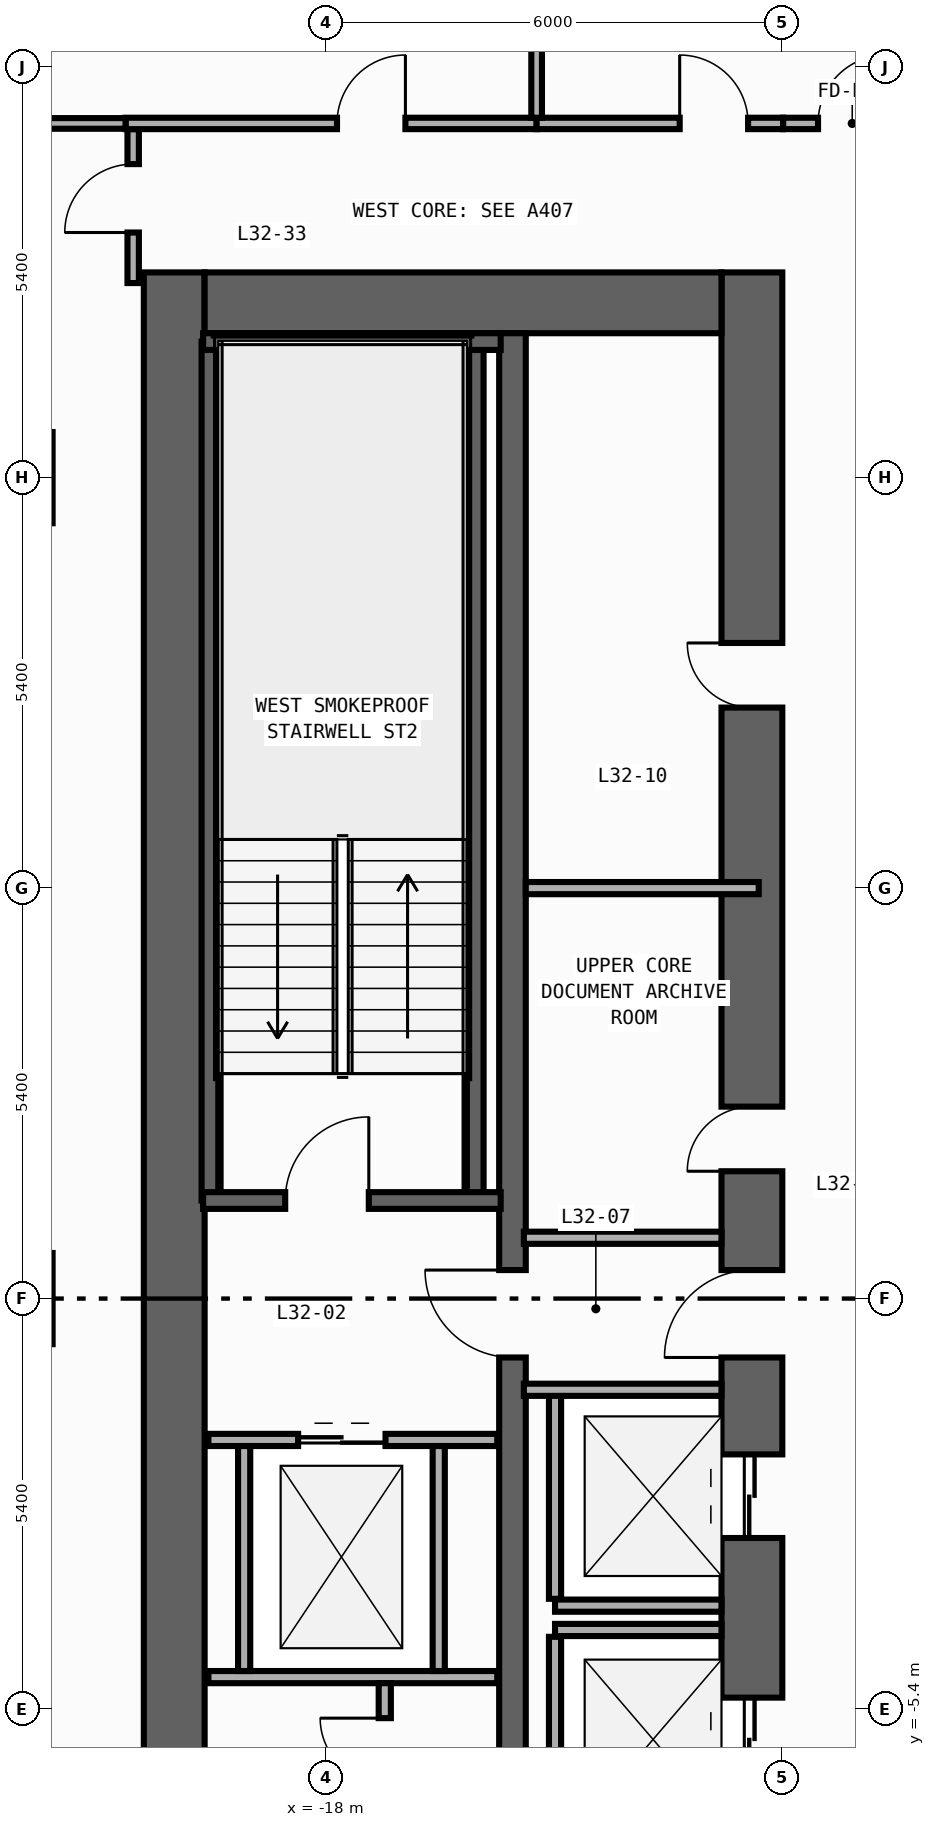
"""IFC4 building model, lengths in metres.
Left out: names, types, materials, properties, quantities, classifications, styles, units other than length and angle.
Written with IfcOpenShell. Run it as: python <this file> out.ifc"""

import sys

from ifc_helpers import new_model, si_unit, direction, frame, frame_2d, origin, origin_2d, place, context, subcontext, project, spatial, rectangle, extrude, element, fill, save


model = new_model("IFC4")
c1 = context("Model", 3, precision=1e-05, world=origin(), true_north=direction((0.0, 1.0)))
c2 = subcontext(c1, "Body", "Model", "MODEL_VIEW")
j1 = project(units=[si_unit("LENGTHUNIT", "METRE"), si_unit("PLANEANGLEUNIT", "RADIAN")], contexts=[c1])
p1 = place(None, origin())
s1 = spatial("IfcSite", under=j1, at=p1, CompositionType="ELEMENT")
p2 = place(p1, origin())
s2 = spatial("IfcBuilding", under=s1, at=p2, CompositionType="ELEMENT")
p3 = place(p2, frame((0.0, 0.0, 139.4)))
s3 = spatial("IfcBuildingStorey", under=s2, at=p3, CompositionType="ELEMENT", Elevation=139.4)
p4 = place(p3, frame((-20.0, -13.5, 0.0), z_axis=(0.0, 0.0, 1.0), x_axis=(0.0, 1.0, 0.0)))
e1 = element("IfcWall", 1, at=p4, inside=s3, PredefinedType="SHEAR", context=c2, shape_type="SweptSolid", body=[
    extrude(rectangle(XDim=27.0, YDim=0.8, at=frame_2d((13.5, 0.0))), origin(), (0.0, 0.0, 1.0), 3.94),
])
p5 = place(p3, frame((-12.4, -13.5, 0.0), z_axis=(0.0, 0.0, 1.0), x_axis=(0.0, 1.0, 0.0)))
e2 = element("IfcWall", 2, at=p5, inside=s3, PredefinedType="SHEAR", context=c2, shape_type="SweptSolid", body=[
    extrude(rectangle(XDim=27.0, YDim=0.8, at=frame_2d((13.5, 0.0))), origin(), (0.0, 0.0, 1.0), 3.94),
])
p6 = place(p5, frame((10.35, 0.0, 0.0)))
e3 = element("IfcOpeningElement", 3, at=p6, cuts=e2, PredefinedType="OPENING", context=c2, shape_type="SweptSolid", body=[
    extrude(rectangle(XDim=1.1, YDim=2.2, at=frame_2d((0.55, 1.1))), frame((0.0, 0.41, 0.0), z_axis=(0.0, -1.0, 0.0), x_axis=(1.0, 0.0, 0.0)), (0.0, 0.0, 1.0), 0.82),
])
p7 = place(p5, frame((7.15, 0.0, 0.0)))
e4 = element("IfcOpeningElement", 4, at=p7, cuts=e2, PredefinedType="OPENING", context=c2, shape_type="SweptSolid", body=[
    extrude(rectangle(XDim=1.1, YDim=2.2, at=frame_2d((0.55, 1.1))), frame((0.0, 0.41, 0.0), z_axis=(0.0, -1.0, 0.0), x_axis=(1.0, 0.0, 0.0)), (0.0, 0.0, 1.0), 0.82),
])
p8 = place(p5, frame((3.95, 0.0, 0.0)))
e5 = element("IfcOpeningElement", 5, at=p8, cuts=e2, PredefinedType="OPENING", context=c2, shape_type="SweptSolid", body=[
    extrude(rectangle(XDim=1.1, YDim=2.2, at=frame_2d((0.55, 1.1))), frame((0.0, 0.41, 0.0), z_axis=(0.0, -1.0, 0.0), x_axis=(1.0, 0.0, 0.0)), (0.0, 0.0, 1.0), 0.82),
])
p9 = place(p5, frame((15.175, 0.0, 0.0)))
e6 = element("IfcOpeningElement", 6, at=p9, cuts=e2, PredefinedType="OPENING", context=c2, shape_type="SweptSolid", body=[
    extrude(rectangle(XDim=0.85, YDim=2.1, at=frame_2d((0.425, 1.05))), frame((0.0, 0.41, 0.0), z_axis=(0.0, -1.0, 0.0), x_axis=(1.0, 0.0, 0.0)), (0.0, 0.0, 1.0), 0.82),
])
p10 = place(p5, frame((21.275, 0.0, 0.0)))
e7 = element("IfcOpeningElement", 7, at=p10, cuts=e2, PredefinedType="OPENING", context=c2, shape_type="SweptSolid", body=[
    extrude(rectangle(XDim=0.85, YDim=2.1, at=frame_2d((0.425, 1.05))), frame((0.0, 0.41, 0.0), z_axis=(0.0, -1.0, 0.0), x_axis=(1.0, 0.0, 0.0)), (0.0, 0.0, 1.0), 0.82),
])
p11 = place(p5, frame((12.725, 0.0, 0.0)))
e8 = element("IfcOpeningElement", 8, at=p11, cuts=e2, PredefinedType="OPENING", context=c2, shape_type="SweptSolid", body=[
    extrude(rectangle(XDim=1.15, YDim=2.2, at=frame_2d((0.575, 1.1))), frame((0.0, 0.41, 0.0), z_axis=(0.0, -1.0, 0.0), x_axis=(1.0, 0.0, 0.0)), (0.0, 0.0, 1.0), 0.82),
])
p12 = place(p5, frame((1.625, 0.0, 0.0)))
e9 = element("IfcOpeningElement", 9, at=p12, cuts=e2, PredefinedType="OPENING", context=c2, shape_type="SweptSolid", body=[
    extrude(rectangle(XDim=0.85, YDim=2.1, at=frame_2d((0.425, 1.05))), frame((0.0, 0.41, 0.0), z_axis=(0.0, -1.0, 0.0), x_axis=(1.0, 0.0, 0.0)), (0.0, 0.0, 1.0), 0.82),
])
p13 = place(p3, frame((-19.6, 13.1, 0.0), z_axis=(0.0, 0.0, 1.0), x_axis=(1.0, 0.0, 0.0)))
e10 = element("IfcWall", 10, at=p13, inside=s3, PredefinedType="SHEAR", context=c2, shape_type="SweptSolid", body=[
    extrude(rectangle(XDim=6.8, YDim=0.8, at=frame_2d((3.4, 0.0))), origin(), (0.0, 0.0, 1.0), 3.94),
])
p14 = place(p3, frame((-15.55, -12.7, 0.0), z_axis=(0.0, 0.0, 1.0), x_axis=(0.0, 1.0, 0.0)))
e11 = element("IfcWall", 11, at=p14, inside=s3, PredefinedType="SHEAR", context=c2, shape_type="SweptSolid", body=[
    extrude(rectangle(XDim=25.4, YDim=0.35, at=frame_2d((12.7, 0.0))), origin(), (0.0, 0.0, 1.0), 3.94),
])
p15 = place(p14, frame((11.925, 0.0, 0.0)))
e12 = element("IfcOpeningElement", 12, at=p15, cuts=e11, PredefinedType="OPENING", context=c2, shape_type="SweptSolid", body=[
    extrude(rectangle(XDim=1.15, YDim=2.2, at=frame_2d((0.575, 1.1))), frame((0.0, 0.185, 0.0), z_axis=(0.0, -1.0, 0.0), x_axis=(1.0, 0.0, 0.0)), (0.0, 0.0, 1.0), 0.37),
])
p16 = place(p14, frame((0.825, 0.0, 0.0)))
e13 = element("IfcOpeningElement", 13, at=p16, cuts=e11, PredefinedType="OPENING", context=c2, shape_type="SweptSolid", body=[
    extrude(rectangle(XDim=0.85, YDim=2.1, at=frame_2d((0.425, 1.05))), frame((0.0, 0.185, 0.0), z_axis=(0.0, -1.0, 0.0), x_axis=(1.0, 0.0, 0.0)), (0.0, 0.0, 1.0), 0.37),
])
for number, where, z_axis, x_axis in (
    (14, (-16.04, 1.29, 0.0), (0.0, 0.0, 1.0), (0.0, 1.0, 0.0)),
    (15, (-19.53, 1.29, 0.0), (0.0, 0.0, 1.0), (0.0, 1.0, 0.0)),
):
    element("IfcWall", number, at=place(p3, frame(where, z_axis=z_axis, x_axis=x_axis)), inside=s3, PredefinedType="SHEAR", context=c2, shape_type="SweptSolid", body=[
        extrude(rectangle(XDim=11.3, YDim=0.22, at=frame_2d((5.65, 0.0))), origin(), (0.0, 0.0, 1.0), 3.94),
    ])
p17 = place(p3, frame((-19.62, 12.59, 0.0), z_axis=(0.0, 0.0, 1.0), x_axis=(1.0, 0.0, 0.0)))
e16 = element("IfcWall", 16, at=p17, inside=s3, PredefinedType="SHEAR", context=c2, shape_type="SweptSolid", body=[
    extrude(rectangle(XDim=3.915, YDim=0.22, at=frame_2d((1.958, 0.0))), origin(), (0.0, 0.0, 1.0), 3.94),
])
p18 = place(p3, frame((-19.62, 1.29, 0.0), z_axis=(0.0, 0.0, 1.0), x_axis=(1.0, 0.0, 0.0)))
e17 = element("IfcWall", 17, at=p18, inside=s3, PredefinedType="SHEAR", context=c2, shape_type="SweptSolid", body=[
    extrude(rectangle(XDim=3.915, YDim=0.22, at=frame_2d((1.958, 0.0))), origin(), (0.0, 0.0, 1.0), 3.94),
])
p19 = place(p18, frame((1.08, 0.0, 0.0)))
e18 = element("IfcOpeningElement", 18, at=p19, cuts=e17, PredefinedType="OPENING", context=c2, shape_type="SweptSolid", body=[
    extrude(rectangle(XDim=1.1, YDim=2.2, at=frame_2d((0.55, 1.1))), frame((0.0, 0.12, 0.0), z_axis=(0.0, -1.0, 0.0), x_axis=(1.0, 0.0, 0.0)), (0.0, 0.0, 1.0), 0.24),
])
for number, where, z_axis, x_axis in (
    (19, (-22.2, 0.0, 0.0), (0.0, 0.0, 1.0), (1.0, 0.0, 0.0)),
    (20, (-22.2, 10.8, 0.0), (0.0, 0.0, 1.0), (1.0, 0.0, 0.0)),
):
    element("IfcColumn", number, at=place(p3, frame(where, z_axis=z_axis, x_axis=x_axis)), inside=s3, PredefinedType="COLUMN", context=c2, shape_type="SweptSolid", body=[
        extrude(rectangle(XDim=1.2, YDim=1.2, at=origin_2d()), origin(), (0.0, 0.0, 1.0), 4.2),
    ])
p20 = place(p3, frame((-14.99, -4.04, 0.0), z_axis=(0.0, 0.0, 1.0), x_axis=(1.0, 0.0, 0.0)))
e21 = element("IfcWall", 21, at=p20, inside=s3, PredefinedType="STANDARD", context=c2, shape_type="SweptSolid", body=[
    extrude(rectangle(XDim=2.19, YDim=0.16, at=frame_2d((1.095, 0.0))), origin(), (0.0, 0.0, 1.0), 3.94),
])
p21 = place(p3, frame((-14.99, -3.95, 0.0), z_axis=(0.0, 0.0, 1.0), x_axis=(0.0, 1.0, 0.0)))
e22 = element("IfcWall", 22, at=p21, inside=s3, PredefinedType="STANDARD", context=c2, shape_type="SweptSolid", body=[
    extrude(rectangle(XDim=2.7, YDim=0.16, at=frame_2d((1.35, 0.0))), origin(), (0.0, 0.0, 1.0), 3.94),
])
p22 = place(p3, frame((-14.99, -4.36, 0.0), z_axis=(0.0, 0.0, 1.0), x_axis=(1.0, 0.0, 0.0)))
e23 = element("IfcWall", 23, at=p22, inside=s3, PredefinedType="STANDARD", context=c2, shape_type="SweptSolid", body=[
    extrude(rectangle(XDim=2.19, YDim=0.16, at=frame_2d((1.095, 0.0))), origin(), (0.0, 0.0, 1.0), 3.94),
])
p23 = place(p3, frame((-14.99, -7.15, 0.0), z_axis=(0.0, 0.0, 1.0), x_axis=(0.0, 1.0, 0.0)))
e24 = element("IfcWall", 24, at=p23, inside=s3, PredefinedType="STANDARD", context=c2, shape_type="SweptSolid", body=[
    extrude(rectangle(XDim=2.7, YDim=0.16, at=frame_2d((1.35, 0.0))), origin(), (0.0, 0.0, 1.0), 3.94),
])
p24 = place(p3, frame((-19.55, -1.86, 0.0), z_axis=(0.0, 0.0, 1.0), x_axis=(1.0, 0.0, 0.0)))
e25 = element("IfcWall", 25, at=p24, inside=s3, PredefinedType="STANDARD", context=c2, shape_type="SweptSolid", body=[
    extrude(rectangle(XDim=3.8, YDim=0.16, at=frame_2d((1.9, 0.0))), origin(), (0.0, 0.0, 1.0), 3.94),
])
p25 = place(p24, frame((1.18, 0.0, 0.0)))
e26 = element("IfcOpeningElement", 26, at=p25, cuts=e25, PredefinedType="OPENING", context=c2, shape_type="SweptSolid", body=[
    extrude(rectangle(XDim=1.15, YDim=2.2, at=frame_2d((0.575, 1.1))), frame((0.0, 0.09, 0.0), z_axis=(0.0, -1.0, 0.0), x_axis=(1.0, 0.0, 0.0)), (0.0, 0.0, 1.0), 0.18),
])
p26 = place(p3, frame((-19.55, -4.98, 0.0), z_axis=(0.0, 0.0, 1.0), x_axis=(1.0, 0.0, 0.0)))
e27 = element("IfcWall", 27, at=p26, inside=s3, PredefinedType="STANDARD", context=c2, shape_type="SweptSolid", body=[
    extrude(rectangle(XDim=3.8, YDim=0.16, at=frame_2d((1.9, 0.0))), origin(), (0.0, 0.0, 1.0), 3.94),
])
for number, where, z_axis, x_axis in (
    (28, (-19.08, -4.9, 0.0), (0.0, 0.0, 1.0), (0.0, 1.0, 0.0)),
    (29, (-16.52, -4.9, 0.0), (0.0, 0.0, 1.0), (0.0, 1.0, 0.0)),
):
    element("IfcWall", number, at=place(p3, frame(where, z_axis=z_axis, x_axis=x_axis)), inside=s3, PredefinedType="STANDARD", context=c2, shape_type="SweptSolid", body=[
        extrude(rectangle(XDim=2.96, YDim=0.16, at=frame_2d((1.48, 0.0))), origin(), (0.0, 0.0, 1.0), 3.94),
    ])
for number, where, z_axis, x_axis in (
    (30, (-15.4, 0.8, 0.0), (0.0, 0.0, 1.0), (1.0, 0.0, 0.0)),
    (31, (-15.4, -1.2, 0.0), (0.0, 0.0, 1.0), (1.0, 0.0, 0.0)),
):
    element("IfcWall", number, at=place(p3, frame(where, z_axis=z_axis, x_axis=x_axis)), inside=s3, PredefinedType="STANDARD", context=c2, shape_type="SweptSolid", body=[
        extrude(rectangle(XDim=2.6, YDim=0.16, at=frame_2d((1.3, 0.0))), origin(), (0.0, 0.0, 1.0), 3.94),
    ])
p27 = place(p3, frame((-17.23, -10.47, 0.0), z_axis=(0.0, 0.0, 1.0), x_axis=(0.0, 1.0, 0.0)))
e32 = element("IfcWall", 32, at=p27, inside=s3, PredefinedType="PARTITIONING", context=c2, shape_type="SweptSolid", body=[
    extrude(rectangle(XDim=5.41, YDim=0.16, at=frame_2d((2.705, 0.0))), origin(), (0.0, 0.0, 1.0), 3.94),
])
p28 = place(p27, frame((4.1, 0.0, 0.0)))
e33 = element("IfcOpeningElement", 33, at=p28, cuts=e32, PredefinedType="OPENING", context=c2, shape_type="SweptSolid", body=[
    extrude(rectangle(XDim=0.85, YDim=2.1, at=frame_2d((0.425, 1.05))), frame((0.0, 0.09, 0.0), z_axis=(0.0, -1.0, 0.0), x_axis=(1.0, 0.0, 0.0)), (0.0, 0.0, 1.0), 0.18),
])
p29 = place(p3, frame((-15.375, 5.4, 0.0), z_axis=(0.0, 0.0, 1.0), x_axis=(1.0, 0.0, 0.0)))
e34 = element("IfcWall", 34, at=p29, inside=s3, PredefinedType="PARTITIONING", context=c2, shape_type="SweptSolid", body=[
    extrude(rectangle(XDim=3.065, YDim=0.16, at=frame_2d((1.532, 0.0))), origin(), (0.0, 0.0, 1.0), 3.94),
])
p30 = place(p3, frame((-11.99, 15.46, 0.0), z_axis=(0.0, 0.0, 1.0), x_axis=(1.0, 0.0, 0.0)))
e35 = element("IfcWall", 35, at=p30, inside=s3, PredefinedType="PARTITIONING", context=c2, shape_type="SweptSolid", body=[
    extrude(rectangle(XDim=1.98, YDim=0.15, at=frame_2d((0.99, 0.0))), origin(), (0.0, 0.0, 1.0), 3.94),
])
p31 = place(p30, frame((0.46, 0.0, 0.0)))
e36 = element("IfcOpeningElement", 36, at=p31, cuts=e35, PredefinedType="OPENING", context=c2, shape_type="SweptSolid", body=[
    extrude(rectangle(XDim=0.9, YDim=2.15, at=frame_2d((0.45, 1.075))), frame((0.0, 0.085, 0.0), z_axis=(0.0, -1.0, 0.0), x_axis=(1.0, 0.0, 0.0)), (0.0, 0.0, 1.0), 0.17),
])
p32 = place(p3, frame((-20.54, 13.36, 0.0), z_axis=(0.0, 0.0, 1.0), x_axis=(0.0, 1.0, 0.0)))
e37 = element("IfcWall", 37, at=p32, inside=s3, PredefinedType="PARTITIONING", context=c2, shape_type="SweptSolid", body=[
    extrude(rectangle(XDim=2.025, YDim=0.15, at=frame_2d((1.012, 0.0))), origin(), (0.0, 0.0, 1.0), 3.94),
])
p33 = place(p32, frame((0.665, 0.0, 0.0)))
e38 = element("IfcOpeningElement", 38, at=p33, cuts=e37, PredefinedType="OPENING", context=c2, shape_type="SweptSolid", body=[
    extrude(rectangle(XDim=0.9, YDim=2.15, at=frame_2d((0.45, 1.075))), frame((0.0, 0.085, 0.0), z_axis=(0.0, -1.0, 0.0), x_axis=(1.0, 0.0, 0.0)), (0.0, 0.0, 1.0), 0.17),
])
p34 = place(p3, frame((-20.64, 15.46, 0.0), z_axis=(0.0, 0.0, 1.0), x_axis=(1.0, 0.0, 0.0)))
e39 = element("IfcWall", 39, at=p34, inside=s3, PredefinedType="PARTITIONING", context=c2, shape_type="SweptSolid", body=[
    extrude(rectangle(XDim=5.408, YDim=0.15, at=frame_2d((2.704, 0.0))), origin(), (0.0, 0.0, 1.0), 3.94),
])
p35 = place(p34, frame((2.781, 0.0, 0.0)))
e40 = element("IfcOpeningElement", 40, at=p35, cuts=e39, PredefinedType="OPENING", context=c2, shape_type="SweptSolid", body=[
    extrude(rectangle(XDim=0.9, YDim=2.15, at=frame_2d((0.45, 1.075))), frame((0.0, 0.085, 0.0), z_axis=(0.0, -1.0, 0.0), x_axis=(1.0, 0.0, 0.0)), (0.0, 0.0, 1.0), 0.17),
])
p36 = place(p3, frame((-15.232, 15.46, 0.0), z_axis=(0.0, 0.0, 1.0), x_axis=(1.0, 0.0, 0.0)))
e41 = element("IfcWall", 41, at=p36, inside=s3, PredefinedType="PARTITIONING", context=c2, shape_type="SweptSolid", body=[
    extrude(rectangle(XDim=3.242, YDim=0.15, at=frame_2d((1.621, 0.0))), origin(), (0.0, 0.0, 1.0), 3.94),
])
p37 = place(p36, frame((1.882, 0.0, 0.0)))
e42 = element("IfcOpeningElement", 42, at=p37, cuts=e41, PredefinedType="OPENING", context=c2, shape_type="SweptSolid", body=[
    extrude(rectangle(XDim=0.9, YDim=2.15, at=frame_2d((0.45, 1.075))), frame((0.0, 0.085, 0.0), z_axis=(0.0, -1.0, 0.0), x_axis=(1.0, 0.0, 0.0)), (0.0, 0.0, 1.0), 0.17),
])
p38 = place(p3, frame((-23.455, 15.46, 0.0), z_axis=(0.0, 0.0, 1.0), x_axis=(1.0, 0.0, 0.0)))
e43 = element("IfcWall", 43, at=p38, inside=s3, PredefinedType="PARTITIONING", context=c2, shape_type="SweptSolid", body=[
    extrude(rectangle(XDim=2.815, YDim=0.14, at=frame_2d((1.408, 0.0))), origin(), (0.0, 0.0, 1.0), 3.94),
])
p39 = place(p3, frame((-15.232, 15.535, 0.0), z_axis=(0.0, 0.0, 1.0), x_axis=(0.0, 1.0, 0.0)))
e44 = element("IfcWall", 44, at=p39, inside=s3, PredefinedType="PARTITIONING", context=c2, shape_type="SweptSolid", body=[
    extrude(rectangle(XDim=10.62, YDim=0.14, at=frame_2d((5.31, 0.0))), origin(), (0.0, 0.0, 1.0), 3.94),
])
p40 = place(p19, origin())
e45 = element("IfcDoor", 45, at=p40, inside=s3, OperationType="SINGLE_SWING_RIGHT", PredefinedType="DOOR", context=c2, shape_type="SweptSolid", body=[
    extrude(rectangle(XDim=1.1, YDim=2.2, at=frame_2d((0.55, 1.1))), frame((0.0, 0.025, 0.0), z_axis=(0.0, -1.0, 0.0), x_axis=(1.0, 0.0, 0.0)), (0.0, 0.0, 1.0), 0.05),
])
fill(e18, e45)
p41 = place(p6, origin())
e46 = element("IfcDoor", 46, at=p41, inside=s3, OperationType="DOUBLE_DOOR_SLIDING", PredefinedType="DOOR", context=c2, shape_type="SweptSolid", body=[
    extrude(rectangle(XDim=1.1, YDim=2.2, at=frame_2d((0.55, 1.1))), frame((0.0, 0.025, 0.0), z_axis=(0.0, -1.0, 0.0), x_axis=(1.0, 0.0, 0.0)), (0.0, 0.0, 1.0), 0.05),
])
fill(e3, e46)
p42 = place(p7, origin())
e47 = element("IfcDoor", 47, at=p42, inside=s3, OperationType="DOUBLE_DOOR_SLIDING", PredefinedType="DOOR", context=c2, shape_type="SweptSolid", body=[
    extrude(rectangle(XDim=1.1, YDim=2.2, at=frame_2d((0.55, 1.1))), frame((0.0, 0.025, 0.0), z_axis=(0.0, -1.0, 0.0), x_axis=(1.0, 0.0, 0.0)), (0.0, 0.0, 1.0), 0.05),
])
fill(e4, e47)
p43 = place(p9, origin())
e48 = element("IfcDoor", 48, at=p43, inside=s3, OperationType="SINGLE_SWING_LEFT", PredefinedType="DOOR", context=c2, shape_type="SweptSolid", body=[
    extrude(rectangle(XDim=0.85, YDim=2.1, at=frame_2d((0.425, 1.05))), frame((0.0, 0.025, 0.0), z_axis=(0.0, -1.0, 0.0), x_axis=(1.0, 0.0, 0.0)), (0.0, 0.0, 1.0), 0.05),
])
fill(e6, e48)
p44 = place(p10, origin())
e49 = element("IfcDoor", 49, at=p44, inside=s3, OperationType="SINGLE_SWING_RIGHT", PredefinedType="DOOR", context=c2, shape_type="SweptSolid", body=[
    extrude(rectangle(XDim=0.85, YDim=2.1, at=frame_2d((0.425, 1.05))), frame((0.0, 0.025, 0.0), z_axis=(0.0, -1.0, 0.0), x_axis=(1.0, 0.0, 0.0)), (0.0, 0.0, 1.0), 0.05),
])
fill(e7, e49)
p45 = place(p11, origin())
e50 = element("IfcDoor", 50, at=p45, inside=s3, OperationType="SINGLE_SWING_LEFT", PredefinedType="DOOR", context=c2, shape_type="SweptSolid", body=[
    extrude(rectangle(XDim=1.15, YDim=2.2, at=frame_2d((0.575, 1.1))), frame((0.0, 0.025, 0.0), z_axis=(0.0, -1.0, 0.0), x_axis=(1.0, 0.0, 0.0)), (0.0, 0.0, 1.0), 0.05),
])
fill(e8, e50)
p46 = place(p15, origin())
e51 = element("IfcDoor", 51, at=p46, inside=s3, OperationType="SINGLE_SWING_RIGHT", PredefinedType="DOOR", context=c2, shape_type="SweptSolid", body=[
    extrude(rectangle(XDim=1.15, YDim=2.2, at=frame_2d((0.575, 1.1))), frame((0.0, 0.025, 0.0), z_axis=(0.0, -1.0, 0.0), x_axis=(1.0, 0.0, 0.0)), (0.0, 0.0, 1.0), 0.05),
])
fill(e12, e51)
p47 = place(p25, origin())
e52 = element("IfcDoor", 52, at=p47, inside=s3, OperationType="DOUBLE_DOOR_SLIDING", PredefinedType="DOOR", context=c2, shape_type="SweptSolid", body=[
    extrude(rectangle(XDim=1.15, YDim=2.2, at=frame_2d((0.575, 1.1))), frame((0.0, 0.025, 0.0), z_axis=(0.0, -1.0, 0.0), x_axis=(1.0, 0.0, 0.0)), (0.0, 0.0, 1.0), 0.05),
])
fill(e26, e52)
p48 = place(p28, origin())
e53 = element("IfcDoor", 53, at=p48, inside=s3, OperationType="SINGLE_SWING_RIGHT", PredefinedType="DOOR", context=c2, shape_type="SweptSolid", body=[
    extrude(rectangle(XDim=0.85, YDim=2.1, at=frame_2d((0.425, 1.05))), frame((0.0, 0.025, 0.0), z_axis=(0.0, -1.0, 0.0), x_axis=(1.0, 0.0, 0.0)), (0.0, 0.0, 1.0), 0.05),
])
fill(e33, e53)
p49 = place(p31, origin())
e54 = element("IfcDoor", 54, at=p49, inside=s3, OperationType="SINGLE_SWING_RIGHT", PredefinedType="DOOR", context=c2, shape_type="SweptSolid", body=[
    extrude(rectangle(XDim=0.9, YDim=2.15, at=frame_2d((0.45, 1.075))), frame((0.0, 0.025, 0.0), z_axis=(0.0, -1.0, 0.0), x_axis=(1.0, 0.0, 0.0)), (0.0, 0.0, 1.0), 0.05),
])
fill(e36, e54)
p50 = place(p33, origin())
e55 = element("IfcDoor", 55, at=p50, inside=s3, OperationType="SINGLE_SWING_LEFT", PredefinedType="DOOR", context=c2, shape_type="SweptSolid", body=[
    extrude(rectangle(XDim=0.9, YDim=2.15, at=frame_2d((0.45, 1.075))), frame((0.0, 0.025, 0.0), z_axis=(0.0, -1.0, 0.0), x_axis=(1.0, 0.0, 0.0)), (0.0, 0.0, 1.0), 0.05),
])
fill(e38, e55)
p51 = place(p35, origin())
e56 = element("IfcDoor", 56, at=p51, inside=s3, OperationType="SINGLE_SWING_RIGHT", PredefinedType="DOOR", context=c2, shape_type="SweptSolid", body=[
    extrude(rectangle(XDim=0.9, YDim=2.15, at=frame_2d((0.45, 1.075))), frame((0.0, 0.025, 0.0), z_axis=(0.0, -1.0, 0.0), x_axis=(1.0, 0.0, 0.0)), (0.0, 0.0, 1.0), 0.05),
])
fill(e40, e56)
p52 = place(p37, origin())
e57 = element("IfcDoor", 57, at=p52, inside=s3, OperationType="SINGLE_SWING_LEFT", PredefinedType="DOOR", context=c2, shape_type="SweptSolid", body=[
    extrude(rectangle(XDim=0.9, YDim=2.15, at=frame_2d((0.45, 1.075))), frame((0.0, 0.025, 0.0), z_axis=(0.0, -1.0, 0.0), x_axis=(1.0, 0.0, 0.0)), (0.0, 0.0, 1.0), 0.05),
])
fill(e42, e57)
save(model, sys.argv[1])
